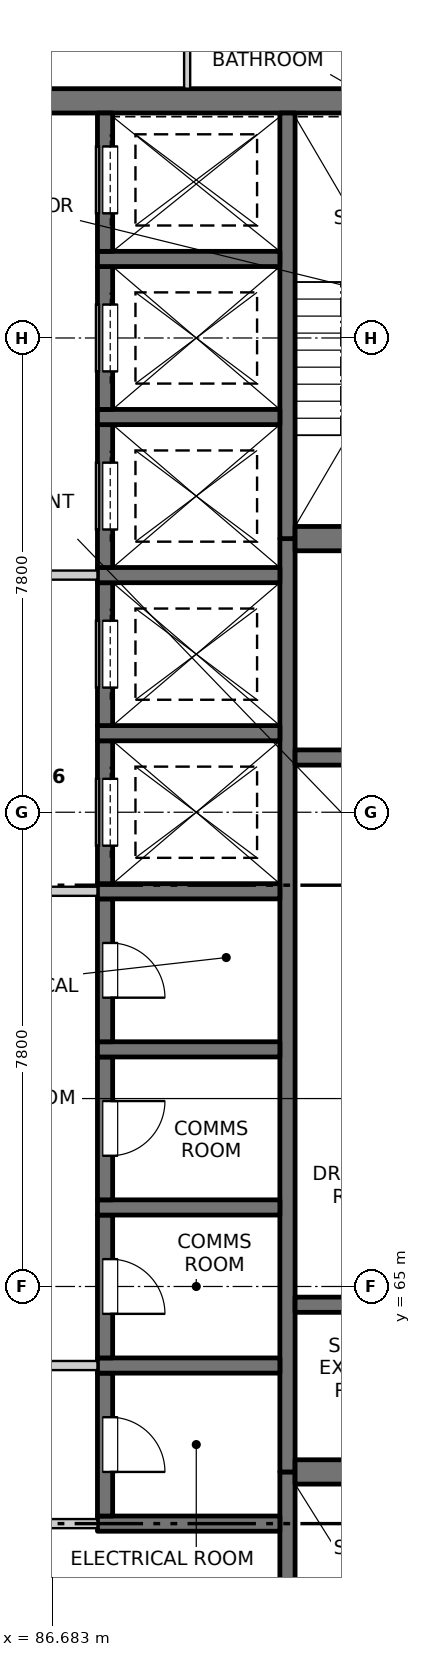
"""IFC4 building model, lengths in metres.
Left out: names, types, materials, properties, quantities, classifications, styles, units other than length and angle.
Written with IfcOpenShell. Run it as: python <this file> out.ifc"""

import sys

from ifc_helpers import new_model, si_unit, direction, frame, frame_2d, origin, place, context, subcontext, project, spatial, rectangle, extrude, element, fill, save


model = new_model("IFC4")
c1 = context("Model", 3, precision=1e-05, world=origin(), true_north=direction((0.0, 1.0)))
c2 = subcontext(c1, "Body", "Model", "MODEL_VIEW")
j1 = project(units=[si_unit("LENGTHUNIT", "METRE"), si_unit("PLANEANGLEUNIT", "RADIAN")], contexts=[c1])
p1 = place(None, origin())
s1 = spatial("IfcSite", under=j1, at=p1, CompositionType="ELEMENT")
p2 = place(p1, origin())
s2 = spatial("IfcBuilding", under=s1, at=p2, CompositionType="ELEMENT")
p3 = place(p2, frame((0.0, 0.0, 234.7)))
s3 = spatial("IfcBuildingStorey", under=s2, at=p3, CompositionType="ELEMENT", Elevation=234.7)
p4 = place(p3, frame((75.45, 84.5, -0.25), z_axis=(0.0, 0.0, 1.0), x_axis=(1.0, 0.0, 0.0)))
e1 = element("IfcWall", 1, at=p4, inside=s3, PredefinedType="SOLIDWALL", context=c2, shape_type="SweptSolid", body=[
    extrude(rectangle(XDim=19.1, YDim=0.4, at=frame_2d((9.55, 0.0))), origin(), (0.0, 0.0, 1.0), 3.4),
])
p5 = place(p3, frame((90.55, 55.45, -0.25), z_axis=(0.0, 0.0, 1.0), x_axis=(0.0, 1.0, 0.0)))
e2 = element("IfcWall", 2, at=p5, inside=s3, PredefinedType="SOLIDWALL", context=c2, shape_type="SweptSolid", body=[
    extrude(rectangle(XDim=6.5, YDim=0.25, at=frame_2d((3.25, 0.0))), origin(), (0.0, 0.0, 1.0), 3.4),
])
p6 = place(p3, frame((90.55, 61.95, -0.25), z_axis=(0.0, 0.0, 1.0), x_axis=(0.0, 1.0, 0.0)))
e3 = element("IfcWall", 3, at=p6, inside=s3, PredefinedType="SOLIDWALL", context=c2, shape_type="SweptSolid", body=[
    extrude(rectangle(XDim=15.35, YDim=0.25, at=frame_2d((7.675, 0.0))), origin(), (0.0, 0.0, 1.0), 3.4),
])
p7 = place(p3, frame((90.55, 77.3, -0.25), z_axis=(0.0, 0.0, 1.0), x_axis=(0.0, 1.0, 0.0)))
e4 = element("IfcWall", 4, at=p7, inside=s3, PredefinedType="SOLIDWALL", context=c2, shape_type="SweptSolid", body=[
    extrude(rectangle(XDim=7.0, YDim=0.25, at=frame_2d((3.5, 0.0))), origin(), (0.0, 0.0, 1.0), 3.4),
])
p8 = place(p3, frame((87.425, 61.1, -0.25), z_axis=(0.0, 0.0, 1.0), x_axis=(1.0, 0.0, 0.0)))
e5 = element("IfcWall", 5, at=p8, inside=s3, PredefinedType="SOLIDWALL", context=c2, shape_type="SweptSolid", body=[
    extrude(rectangle(XDim=3.0, YDim=0.25, at=frame_2d((1.5, 0.0))), origin(), (0.0, 0.0, 1.0), 3.4),
])
p9 = place(p3, frame((87.55, 61.225, -0.25), z_axis=(0.0, 0.0, 1.0), x_axis=(0.0, 1.0, 0.0)))
e6 = element("IfcWall", 6, at=p9, inside=s3, PredefinedType="SOLIDWALL", context=c2, shape_type="SweptSolid", body=[
    extrude(rectangle(XDim=2.35, YDim=0.25, at=frame_2d((1.175, 0.0))), origin(), (0.0, 0.0, 1.0), 3.4),
])
p10 = place(p9, frame((0.725, 0.0, 0.25)))
e7 = element("IfcOpeningElement", 7, at=p10, cuts=e6, PredefinedType="OPENING", context=c2, shape_type="SweptSolid", body=[
    extrude(rectangle(XDim=0.9, YDim=2.1, at=frame_2d((0.45, 1.05))), frame((0.0, 0.135, 0.0), z_axis=(0.0, -1.0, 0.0), x_axis=(1.0, 0.0, 0.0)), (0.0, 0.0, 1.0), 0.27),
])
p11 = place(p3, frame((87.425, 63.7, -0.25), z_axis=(0.0, 0.0, 1.0), x_axis=(1.0, 0.0, 0.0)))
e8 = element("IfcWall", 8, at=p11, inside=s3, PredefinedType="SOLIDWALL", context=c2, shape_type="SweptSolid", body=[
    extrude(rectangle(XDim=3.0, YDim=0.25, at=frame_2d((1.5, 0.0))), origin(), (0.0, 0.0, 1.0), 3.4),
])
p12 = place(p3, frame((87.55, 63.825, -0.25), z_axis=(0.0, 0.0, 1.0), x_axis=(0.0, 1.0, 0.0)))
e9 = element("IfcWall", 9, at=p12, inside=s3, PredefinedType="SOLIDWALL", context=c2, shape_type="SweptSolid", body=[
    extrude(rectangle(XDim=2.35, YDim=0.25, at=frame_2d((1.175, 0.0))), origin(), (0.0, 0.0, 1.0), 3.4),
])
p13 = place(p12, frame((0.725, 0.0, 0.25)))
e10 = element("IfcOpeningElement", 10, at=p13, cuts=e9, PredefinedType="OPENING", context=c2, shape_type="SweptSolid", body=[
    extrude(rectangle(XDim=0.9, YDim=2.1, at=frame_2d((0.45, 1.05))), frame((0.0, 0.135, 0.0), z_axis=(0.0, -1.0, 0.0), x_axis=(1.0, 0.0, 0.0)), (0.0, 0.0, 1.0), 0.27),
])
p14 = place(p3, frame((87.425, 66.3, -0.25), z_axis=(0.0, 0.0, 1.0), x_axis=(1.0, 0.0, 0.0)))
e11 = element("IfcWall", 11, at=p14, inside=s3, PredefinedType="SOLIDWALL", context=c2, shape_type="SweptSolid", body=[
    extrude(rectangle(XDim=3.0, YDim=0.25, at=frame_2d((1.5, 0.0))), origin(), (0.0, 0.0, 1.0), 3.4),
])
p15 = place(p3, frame((87.55, 66.425, -0.25), z_axis=(0.0, 0.0, 1.0), x_axis=(0.0, 1.0, 0.0)))
e12 = element("IfcWall", 12, at=p15, inside=s3, PredefinedType="SOLIDWALL", context=c2, shape_type="SweptSolid", body=[
    extrude(rectangle(XDim=2.35, YDim=0.25, at=frame_2d((1.175, 0.0))), origin(), (0.0, 0.0, 1.0), 3.4),
])
p16 = place(p15, frame((0.725, 0.0, 0.25)))
e13 = element("IfcOpeningElement", 13, at=p16, cuts=e12, PredefinedType="OPENING", context=c2, shape_type="SweptSolid", body=[
    extrude(rectangle(XDim=0.9, YDim=2.1, at=frame_2d((0.45, 1.05))), frame((0.0, 0.135, 0.0), z_axis=(0.0, -1.0, 0.0), x_axis=(1.0, 0.0, 0.0)), (0.0, 0.0, 1.0), 0.27),
])
p17 = place(p3, frame((87.425, 68.9, -0.25), z_axis=(0.0, 0.0, 1.0), x_axis=(1.0, 0.0, 0.0)))
e14 = element("IfcWall", 14, at=p17, inside=s3, PredefinedType="SOLIDWALL", context=c2, shape_type="SweptSolid", body=[
    extrude(rectangle(XDim=3.0, YDim=0.25, at=frame_2d((1.5, 0.0))), origin(), (0.0, 0.0, 1.0), 3.4),
])
p18 = place(p3, frame((87.55, 69.025, -0.25), z_axis=(0.0, 0.0, 1.0), x_axis=(0.0, 1.0, 0.0)))
e15 = element("IfcWall", 15, at=p18, inside=s3, PredefinedType="SOLIDWALL", context=c2, shape_type="SweptSolid", body=[
    extrude(rectangle(XDim=2.35, YDim=0.25, at=frame_2d((1.175, 0.0))), origin(), (0.0, 0.0, 1.0), 3.4),
])
p19 = place(p18, frame((0.725, 0.0, 0.25)))
e16 = element("IfcOpeningElement", 16, at=p19, cuts=e15, PredefinedType="OPENING", context=c2, shape_type="SweptSolid", body=[
    extrude(rectangle(XDim=0.9, YDim=2.1, at=frame_2d((0.45, 1.05))), frame((0.0, 0.135, 0.0), z_axis=(0.0, -1.0, 0.0), x_axis=(1.0, 0.0, 0.0)), (0.0, 0.0, 1.0), 0.27),
])
p20 = place(p3, frame((87.425, 71.5, -0.25), z_axis=(0.0, 0.0, 1.0), x_axis=(1.0, 0.0, 0.0)))
e17 = element("IfcWall", 17, at=p20, inside=s3, PredefinedType="SOLIDWALL", context=c2, shape_type="SweptSolid", body=[
    extrude(rectangle(XDim=3.0, YDim=0.25, at=frame_2d((1.5, 0.0))), origin(), (0.0, 0.0, 1.0), 3.4),
])
p21 = place(p3, frame((87.55, 71.625, -0.25), z_axis=(0.0, 0.0, 1.0), x_axis=(0.0, 1.0, 0.0)))
e18 = element("IfcWall", 18, at=p21, inside=s3, PredefinedType="SOLIDWALL", context=c2, shape_type="SweptSolid", body=[
    extrude(rectangle(XDim=2.35, YDim=0.25, at=frame_2d((1.175, 0.0))), origin(), (0.0, 0.0, 1.0), 3.4),
])
p22 = place(p21, frame((0.625, 0.0, 0.25)))
e19 = element("IfcOpeningElement", 19, at=p22, cuts=e18, PredefinedType="OPENING", context=c2, shape_type="SweptSolid", body=[
    extrude(rectangle(XDim=1.1, YDim=2.1, at=frame_2d((0.55, 1.05))), frame((0.0, 0.135, 0.0), z_axis=(0.0, -1.0, 0.0), x_axis=(1.0, 0.0, 0.0)), (0.0, 0.0, 1.0), 0.27),
])
p23 = place(p3, frame((87.425, 74.1, -0.25), z_axis=(0.0, 0.0, 1.0), x_axis=(1.0, 0.0, 0.0)))
e20 = element("IfcWall", 20, at=p23, inside=s3, PredefinedType="SOLIDWALL", context=c2, shape_type="SweptSolid", body=[
    extrude(rectangle(XDim=3.0, YDim=0.25, at=frame_2d((1.5, 0.0))), origin(), (0.0, 0.0, 1.0), 3.4),
])
p24 = place(p3, frame((87.55, 74.225, -0.25), z_axis=(0.0, 0.0, 1.0), x_axis=(0.0, 1.0, 0.0)))
e21 = element("IfcWall", 21, at=p24, inside=s3, PredefinedType="SOLIDWALL", context=c2, shape_type="SweptSolid", body=[
    extrude(rectangle(XDim=2.35, YDim=0.25, at=frame_2d((1.175, 0.0))), origin(), (0.0, 0.0, 1.0), 3.4),
])
p25 = place(p24, frame((0.625, 0.0, 0.25)))
e22 = element("IfcOpeningElement", 22, at=p25, cuts=e21, PredefinedType="OPENING", context=c2, shape_type="SweptSolid", body=[
    extrude(rectangle(XDim=1.1, YDim=2.1, at=frame_2d((0.55, 1.05))), frame((0.0, 0.135, 0.0), z_axis=(0.0, -1.0, 0.0), x_axis=(1.0, 0.0, 0.0)), (0.0, 0.0, 1.0), 0.27),
])
p26 = place(p3, frame((87.425, 76.7, -0.25), z_axis=(0.0, 0.0, 1.0), x_axis=(1.0, 0.0, 0.0)))
e23 = element("IfcWall", 23, at=p26, inside=s3, PredefinedType="SOLIDWALL", context=c2, shape_type="SweptSolid", body=[
    extrude(rectangle(XDim=3.0, YDim=0.25, at=frame_2d((1.5, 0.0))), origin(), (0.0, 0.0, 1.0), 3.4),
])
p27 = place(p3, frame((87.55, 76.825, -0.25), z_axis=(0.0, 0.0, 1.0), x_axis=(0.0, 1.0, 0.0)))
e24 = element("IfcWall", 24, at=p27, inside=s3, PredefinedType="SOLIDWALL", context=c2, shape_type="SweptSolid", body=[
    extrude(rectangle(XDim=2.35, YDim=0.25, at=frame_2d((1.175, 0.0))), origin(), (0.0, 0.0, 1.0), 3.4),
])
p28 = place(p27, frame((0.625, 0.0, 0.25)))
e25 = element("IfcOpeningElement", 25, at=p28, cuts=e24, PredefinedType="OPENING", context=c2, shape_type="SweptSolid", body=[
    extrude(rectangle(XDim=1.1, YDim=2.1, at=frame_2d((0.55, 1.05))), frame((0.0, 0.135, 0.0), z_axis=(0.0, -1.0, 0.0), x_axis=(1.0, 0.0, 0.0)), (0.0, 0.0, 1.0), 0.27),
])
p29 = place(p3, frame((87.425, 79.3, -0.25), z_axis=(0.0, 0.0, 1.0), x_axis=(1.0, 0.0, 0.0)))
e26 = element("IfcWall", 26, at=p29, inside=s3, PredefinedType="SOLIDWALL", context=c2, shape_type="SweptSolid", body=[
    extrude(rectangle(XDim=3.0, YDim=0.25, at=frame_2d((1.5, 0.0))), origin(), (0.0, 0.0, 1.0), 3.4),
])
p30 = place(p3, frame((87.55, 79.425, -0.25), z_axis=(0.0, 0.0, 1.0), x_axis=(0.0, 1.0, 0.0)))
e27 = element("IfcWall", 27, at=p30, inside=s3, PredefinedType="SOLIDWALL", context=c2, shape_type="SweptSolid", body=[
    extrude(rectangle(XDim=2.35, YDim=0.25, at=frame_2d((1.175, 0.0))), origin(), (0.0, 0.0, 1.0), 3.4),
])
p31 = place(p30, frame((0.625, 0.0, 0.25)))
e28 = element("IfcOpeningElement", 28, at=p31, cuts=e27, PredefinedType="OPENING", context=c2, shape_type="SweptSolid", body=[
    extrude(rectangle(XDim=1.1, YDim=2.1, at=frame_2d((0.55, 1.05))), frame((0.0, 0.135, 0.0), z_axis=(0.0, -1.0, 0.0), x_axis=(1.0, 0.0, 0.0)), (0.0, 0.0, 1.0), 0.27),
])
p32 = place(p3, frame((87.425, 81.9, -0.25), z_axis=(0.0, 0.0, 1.0), x_axis=(1.0, 0.0, 0.0)))
e29 = element("IfcWall", 29, at=p32, inside=s3, PredefinedType="SOLIDWALL", context=c2, shape_type="SweptSolid", body=[
    extrude(rectangle(XDim=3.0, YDim=0.25, at=frame_2d((1.5, 0.0))), origin(), (0.0, 0.0, 1.0), 3.4),
])
p33 = place(p3, frame((87.55, 82.025, -0.25), z_axis=(0.0, 0.0, 1.0), x_axis=(0.0, 1.0, 0.0)))
e30 = element("IfcWall", 30, at=p33, inside=s3, PredefinedType="SOLIDWALL", context=c2, shape_type="SweptSolid", body=[
    extrude(rectangle(XDim=2.275, YDim=0.25, at=frame_2d((1.138, 0.0))), origin(), (0.0, 0.0, 1.0), 3.4),
])
p34 = place(p33, frame((0.625, 0.0, 0.25)))
e31 = element("IfcOpeningElement", 31, at=p34, cuts=e30, PredefinedType="OPENING", context=c2, shape_type="SweptSolid", body=[
    extrude(rectangle(XDim=1.1, YDim=2.1, at=frame_2d((0.55, 1.05))), frame((0.0, 0.135, 0.0), z_axis=(0.0, -1.0, 0.0), x_axis=(1.0, 0.0, 0.0)), (0.0, 0.0, 1.0), 0.27),
])
p35 = place(p3, frame((90.675, 61.95, -0.25), z_axis=(0.0, 0.0, 1.0), x_axis=(1.0, 0.0, 0.0)))
e32 = element("IfcWall", 32, at=p35, inside=s3, PredefinedType="SOLIDWALL", context=c2, shape_type="SweptSolid", body=[
    extrude(rectangle(XDim=3.875, YDim=0.4, at=frame_2d((1.938, 0.0))), origin(), (0.0, 0.0, 1.0), 3.4),
])
for number, where, z_axis, x_axis in (
    (33, (90.675, 64.7, -0.25), (0.0, 0.0, 1.0), (1.0, 0.0, 0.0)),
    (34, (90.675, 73.7, -0.25), (0.0, 0.0, 1.0), (1.0, 0.0, 0.0)),
):
    element("IfcWall", number, at=place(p3, frame(where, z_axis=z_axis, x_axis=x_axis)), inside=s3, PredefinedType="SOLIDWALL", context=c2, shape_type="SweptSolid", body=[
        extrude(rectangle(XDim=3.875, YDim=0.25, at=frame_2d((1.938, 0.0))), origin(), (0.0, 0.0, 1.0), 3.4),
    ])
p36 = place(p3, frame((90.675, 77.3, -0.25), z_axis=(0.0, 0.0, 1.0), x_axis=(1.0, 0.0, 0.0)))
e35 = element("IfcWall", 35, at=p36, inside=s3, PredefinedType="SOLIDWALL", context=c2, shape_type="SweptSolid", body=[
    extrude(rectangle(XDim=3.875, YDim=0.4, at=frame_2d((1.938, 0.0))), origin(), (0.0, 0.0, 1.0), 3.4),
])
p37 = place(p3, frame((82.575, 61.1, 0.0), z_axis=(0.0, 0.0, 1.0), x_axis=(1.0, 0.0, 0.0)))
e36 = element("IfcWall", 36, at=p37, inside=s3, PredefinedType="PARTITIONING", context=c2, shape_type="SweptSolid", body=[
    extrude(rectangle(XDim=4.85, YDim=0.15, at=frame_2d((2.425, 0.0))), origin(), (0.0, 0.0, 1.0), 3.15),
])
p38 = place(p37, frame((1.525, 0.0, 0.0)))
e37 = element("IfcOpeningElement", 37, at=p38, cuts=e36, PredefinedType="OPENING", context=c2, shape_type="SweptSolid", body=[
    extrude(rectangle(XDim=1.8, YDim=2.1, at=frame_2d((0.9, 1.05))), frame((0.0, 0.085, 0.0), z_axis=(0.0, -1.0, 0.0), x_axis=(1.0, 0.0, 0.0)), (0.0, 0.0, 1.0), 0.17),
])
p39 = place(p3, frame((82.575, 63.7, 0.0), z_axis=(0.0, 0.0, 1.0), x_axis=(1.0, 0.0, 0.0)))
e38 = element("IfcWall", 38, at=p39, inside=s3, PredefinedType="PARTITIONING", context=c2, shape_type="SweptSolid", body=[
    extrude(rectangle(XDim=4.85, YDim=0.15, at=frame_2d((2.425, 0.0))), origin(), (0.0, 0.0, 1.0), 3.15),
])
p40 = place(p39, frame((1.525, 0.0, 0.0)))
e39 = element("IfcOpeningElement", 39, at=p40, cuts=e38, PredefinedType="OPENING", context=c2, shape_type="SweptSolid", body=[
    extrude(rectangle(XDim=1.8, YDim=2.1, at=frame_2d((0.9, 1.05))), frame((0.0, 0.085, 0.0), z_axis=(0.0, -1.0, 0.0), x_axis=(1.0, 0.0, 0.0)), (0.0, 0.0, 1.0), 0.17),
])
p41 = place(p3, frame((82.575, 71.5, 0.0), z_axis=(0.0, 0.0, 1.0), x_axis=(1.0, 0.0, 0.0)))
e40 = element("IfcWall", 40, at=p41, inside=s3, PredefinedType="PARTITIONING", context=c2, shape_type="SweptSolid", body=[
    extrude(rectangle(XDim=4.85, YDim=0.15, at=frame_2d((2.425, 0.0))), origin(), (0.0, 0.0, 1.0), 3.15),
])
p42 = place(p41, frame((1.525, 0.0, 0.0)))
e41 = element("IfcOpeningElement", 41, at=p42, cuts=e40, PredefinedType="OPENING", context=c2, shape_type="SweptSolid", body=[
    extrude(rectangle(XDim=1.8, YDim=2.1, at=frame_2d((0.9, 1.05))), frame((0.0, 0.085, 0.0), z_axis=(0.0, -1.0, 0.0), x_axis=(1.0, 0.0, 0.0)), (0.0, 0.0, 1.0), 0.17),
])
p43 = place(p3, frame((82.575, 76.7, 0.0), z_axis=(0.0, 0.0, 1.0), x_axis=(1.0, 0.0, 0.0)))
e42 = element("IfcWall", 42, at=p43, inside=s3, PredefinedType="PARTITIONING", context=c2, shape_type="SweptSolid", body=[
    extrude(rectangle(XDim=4.85, YDim=0.15, at=frame_2d((2.425, 0.0))), origin(), (0.0, 0.0, 1.0), 3.15),
])
p44 = place(p43, frame((1.525, 0.0, 0.0)))
e43 = element("IfcOpeningElement", 43, at=p44, cuts=e42, PredefinedType="OPENING", context=c2, shape_type="SweptSolid", body=[
    extrude(rectangle(XDim=1.8, YDim=2.1, at=frame_2d((0.9, 1.05))), frame((0.0, 0.085, 0.0), z_axis=(0.0, -1.0, 0.0), x_axis=(1.0, 0.0, 0.0)), (0.0, 0.0, 1.0), 0.17),
])
p45 = place(p3, frame((88.9, 84.7, 0.0), z_axis=(0.0, 0.0, 1.0), x_axis=(0.0, 1.0, 0.0)))
e44 = element("IfcWall", 44, at=p45, inside=s3, PredefinedType="PARTITIONING", context=c2, shape_type="SweptSolid", body=[
    extrude(rectangle(XDim=3.4, YDim=0.1, at=frame_2d((1.7, 0.0))), origin(), (0.0, 0.0, 1.0), 3.15),
])
p46 = place(p45, frame((1.3, 0.0, 0.0)))
e45 = element("IfcOpeningElement", 45, at=p46, cuts=e44, PredefinedType="OPENING", context=c2, shape_type="SweptSolid", body=[
    extrude(rectangle(XDim=0.9, YDim=2.1, at=frame_2d((0.45, 1.05))), frame((0.0, 0.06, 0.0), z_axis=(0.0, -1.0, 0.0), x_axis=(1.0, 0.0, 0.0)), (0.0, 0.0, 1.0), 0.12),
])
p47 = place(p10, origin())
e46 = element("IfcDoor", 46, at=p47, inside=s3, OperationType="SINGLE_SWING_RIGHT", PredefinedType="DOOR", context=c2, shape_type="SweptSolid", body=[
    extrude(rectangle(XDim=0.9, YDim=2.1, at=frame_2d((0.45, 1.05))), frame((0.0, -0.06, 0.0), z_axis=(0.0, -1.0, 0.0), x_axis=(1.0, 0.0, 0.0)), (0.0, 0.0, 1.0), 0.05),
])
fill(e7, e46)
p48 = place(p13, origin())
e47 = element("IfcDoor", 47, at=p48, inside=s3, OperationType="SINGLE_SWING_RIGHT", PredefinedType="DOOR", context=c2, shape_type="SweptSolid", body=[
    extrude(rectangle(XDim=0.9, YDim=2.1, at=frame_2d((0.45, 1.05))), frame((0.0, -0.06, 0.0), z_axis=(0.0, -1.0, 0.0), x_axis=(1.0, 0.0, 0.0)), (0.0, 0.0, 1.0), 0.05),
])
fill(e10, e47)
p49 = place(p16, origin())
e48 = element("IfcDoor", 48, at=p49, inside=s3, OperationType="SINGLE_SWING_LEFT", PredefinedType="DOOR", context=c2, shape_type="SweptSolid", body=[
    extrude(rectangle(XDim=0.9, YDim=2.1, at=frame_2d((0.45, 1.05))), frame((0.0, -0.06, 0.0), z_axis=(0.0, -1.0, 0.0), x_axis=(1.0, 0.0, 0.0)), (0.0, 0.0, 1.0), 0.05),
])
fill(e13, e48)
p50 = place(p19, origin())
e49 = element("IfcDoor", 49, at=p50, inside=s3, OperationType="SINGLE_SWING_RIGHT", PredefinedType="DOOR", context=c2, shape_type="SweptSolid", body=[
    extrude(rectangle(XDim=0.9, YDim=2.1, at=frame_2d((0.45, 1.05))), frame((0.0, -0.06, 0.0), z_axis=(0.0, -1.0, 0.0), x_axis=(1.0, 0.0, 0.0)), (0.0, 0.0, 1.0), 0.05),
])
fill(e16, e49)
p51 = place(p22, origin())
e50 = element("IfcDoor", 50, at=p51, inside=s3, OperationType="SLIDING_TO_LEFT", PredefinedType="DOOR", context=c2, shape_type="SweptSolid", body=[
    extrude(rectangle(XDim=1.1, YDim=2.1, at=frame_2d((0.55, 1.05))), frame((0.0, -0.06, 0.0), z_axis=(0.0, -1.0, 0.0), x_axis=(1.0, 0.0, 0.0)), (0.0, 0.0, 1.0), 0.05),
])
fill(e19, e50)
p52 = place(p25, origin())
e51 = element("IfcDoor", 51, at=p52, inside=s3, OperationType="SLIDING_TO_LEFT", PredefinedType="DOOR", context=c2, shape_type="SweptSolid", body=[
    extrude(rectangle(XDim=1.1, YDim=2.1, at=frame_2d((0.55, 1.05))), frame((0.0, -0.06, 0.0), z_axis=(0.0, -1.0, 0.0), x_axis=(1.0, 0.0, 0.0)), (0.0, 0.0, 1.0), 0.05),
])
fill(e22, e51)
p53 = place(p28, origin())
e52 = element("IfcDoor", 52, at=p53, inside=s3, OperationType="SLIDING_TO_LEFT", PredefinedType="DOOR", context=c2, shape_type="SweptSolid", body=[
    extrude(rectangle(XDim=1.1, YDim=2.1, at=frame_2d((0.55, 1.05))), frame((0.0, -0.06, 0.0), z_axis=(0.0, -1.0, 0.0), x_axis=(1.0, 0.0, 0.0)), (0.0, 0.0, 1.0), 0.05),
])
fill(e25, e52)
p54 = place(p31, origin())
e53 = element("IfcDoor", 53, at=p54, inside=s3, OperationType="SLIDING_TO_RIGHT", PredefinedType="DOOR", context=c2, shape_type="SweptSolid", body=[
    extrude(rectangle(XDim=1.1, YDim=2.1, at=frame_2d((0.55, 1.05))), frame((0.0, -0.06, 0.0), z_axis=(0.0, -1.0, 0.0), x_axis=(1.0, 0.0, 0.0)), (0.0, 0.0, 1.0), 0.05),
])
fill(e28, e53)
p55 = place(p34, origin())
e54 = element("IfcDoor", 54, at=p55, inside=s3, OperationType="SLIDING_TO_RIGHT", PredefinedType="DOOR", context=c2, shape_type="SweptSolid", body=[
    extrude(rectangle(XDim=1.1, YDim=2.1, at=frame_2d((0.55, 1.05))), frame((0.0, -0.06, 0.0), z_axis=(0.0, -1.0, 0.0), x_axis=(1.0, 0.0, 0.0)), (0.0, 0.0, 1.0), 0.05),
])
fill(e31, e54)
save(model, sys.argv[1])
